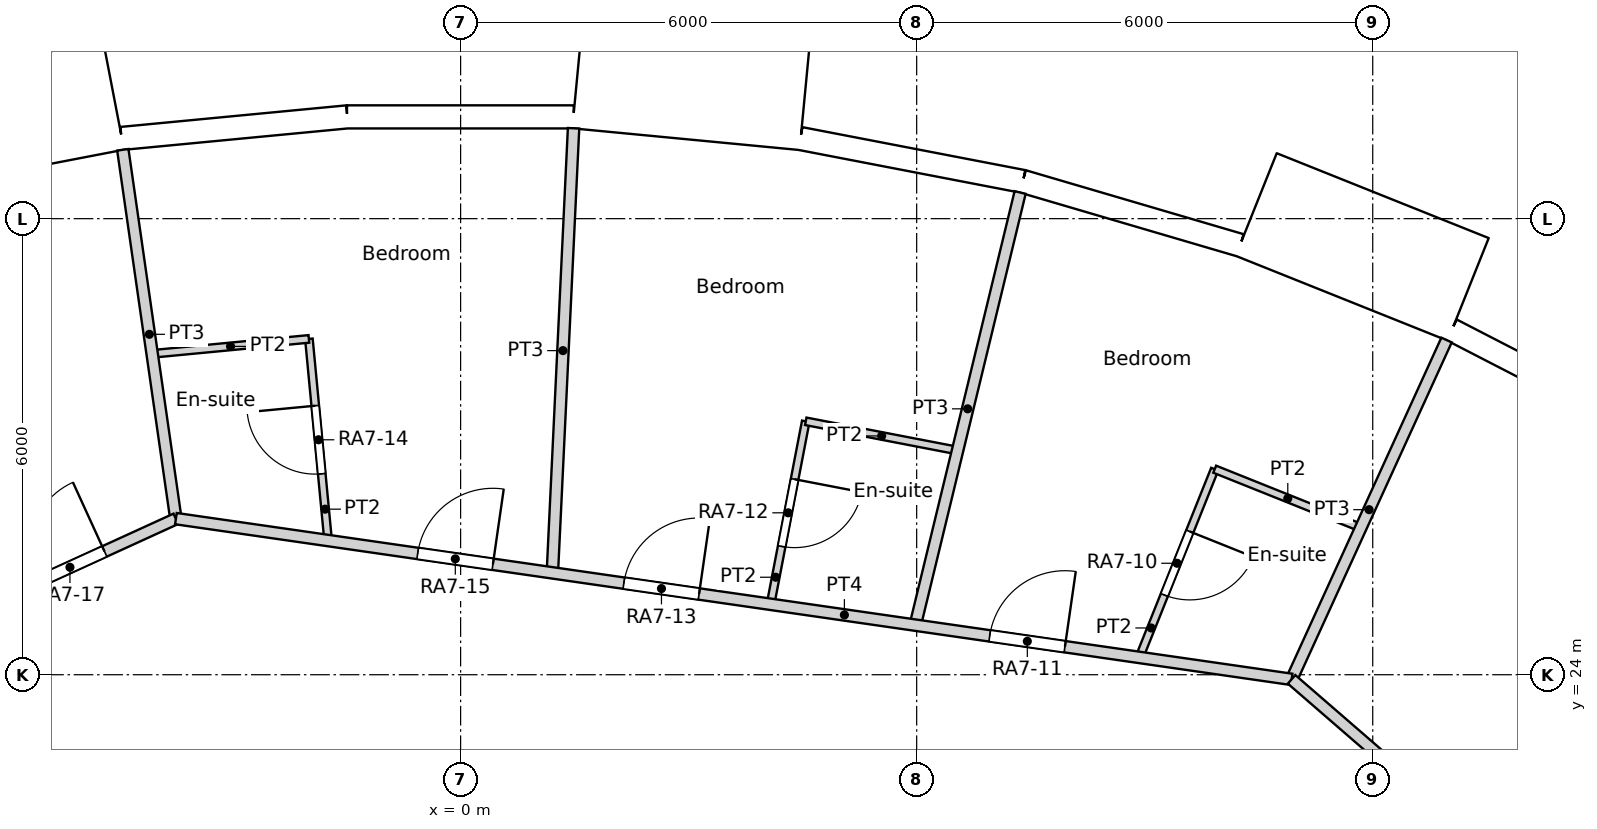
"""IFC4 building model, lengths in metres.
Left out: names, types, materials, properties, quantities, classifications, styles, units other than length and angle.
Written with IfcOpenShell. Run it as: python <this file> out.ifc"""

import sys

from ifc_helpers import new_model, si_unit, direction, frame, frame_2d, origin, origin_2d, place, context, subcontext, project, spatial, rectangle, circle, extrude, element, fill, save


model = new_model("IFC4")
c1 = context("Model", 3, precision=1e-05, world=origin(), true_north=direction((0.0, 1.0)))
c2 = subcontext(c1, "Body", "Model", "MODEL_VIEW")
j1 = project(units=[si_unit("LENGTHUNIT", "METRE"), si_unit("PLANEANGLEUNIT", "RADIAN")], contexts=[c1])
p1 = place(None, origin())
s1 = spatial("IfcSite", under=j1, at=p1, CompositionType="ELEMENT")
p2 = place(p1, origin())
s2 = spatial("IfcBuilding", under=s1, at=p2, CompositionType="ELEMENT")
p3 = place(p2, frame((0.0, 0.0, 93.0)))
s3 = spatial("IfcBuildingStorey", under=s2, at=p3, CompositionType="ELEMENT", Elevation=93.0)
for number, where, z_axis, x_axis in (
    (1, (12.576, 27.539, 0.0), (0.0, 0.0, 1.0), (1.0, 0.0, 0.0)),
    (2, (7.137, 29.421, 0.0), (0.0, 0.0, 1.0), (1.0, 0.0, 0.0)),
    (3, (1.44, 30.24, 0.0), (0.0, 0.0, 1.0), (1.0, 0.0, 0.0)),
    (4, (-4.309, 29.966, 0.0), (0.0, 0.0, 1.0), (1.0, 0.0, 0.0)),
):
    element("IfcColumn", number, at=place(p3, frame(where, z_axis=z_axis, x_axis=x_axis)), inside=s3, PredefinedType="COLUMN", context=c2, shape_type="SweptSolid", body=[
        extrude(circle(Radius=0.6, at=origin_2d()), origin(), (0.0, 0.0, 1.0), 3.6),
    ])
for number, where, z_axis, x_axis in (
    (5, (9.723, 22.54, 0.0), (0.0, 0.0, 1.0), (1.0, 0.0, 0.0)),
    (6, (4.263, 24.175, 0.0), (0.0, 0.0, 1.0), (1.0, 0.0, 0.0)),
    (7, (-1.427, 24.506, 0.0), (0.0, 0.0, 1.0), (1.0, 0.0, 0.0)),
):
    element("IfcColumn", number, at=place(p3, frame(where, z_axis=z_axis, x_axis=x_axis)), inside=s3, PredefinedType="COLUMN", context=c2, shape_type="SweptSolid", body=[
        extrude(circle(Radius=0.65, at=origin_2d()), origin(), (0.0, 0.0, 1.0), 3.6),
    ])
p4 = place(p3, frame((15.687, 27.171, 0.0), z_axis=(0.0, 0.0, 1.0), x_axis=(-0.888853225096, 0.4581920386, 0.0)))
e8 = element("IfcWall", 8, at=p4, inside=s3, PredefinedType="SOLIDWALL", context=c2, shape_type="SweptSolid", body=[
    extrude(rectangle(XDim=2.979, YDim=0.3, at=frame_2d((1.49, 0.0))), origin(), (0.0, 0.0, 1.0), 3.15),
])
p5 = place(p4, frame((1.49, 0.0, 1.55)))
e9 = element("IfcOpeningElement", 9, at=p5, cuts=e8, PredefinedType="OPENING", context=c2, shape_type="SweptSolid", body=[
    extrude(circle(Radius=0.9, at=origin_2d()), frame((0.0, 0.16, 0.0), z_axis=(0.0, -1.0, 0.0), x_axis=(1.0, 0.0, 0.0)), (0.0, 0.0, 1.0), 0.32),
])
p6 = place(p3, frame((13.254, 29.07, -0.45), z_axis=(0.0, 0.0, 1.0), x_axis=(-0.928358776184, 0.371685327504, 0.0)))
e10 = element("IfcWall", 10, at=p6, inside=s3, PredefinedType="ELEMENTEDWALL", context=c2, shape_type="SweptSolid", body=[
    extrude(rectangle(XDim=3.0, YDim=1.45, at=frame_2d((1.5, 0.0))), origin(), (0.0, 0.0, 1.0), 3.6),
])
p7 = place(p6, frame((1.5, 0.0, 2.0)))
e11 = element("IfcOpeningElement", 11, at=p7, cuts=e10, PredefinedType="OPENING", context=c2, shape_type="SweptSolid", body=[
    extrude(circle(Radius=0.9, at=origin_2d()), frame((0.0, 0.735, 0.0), z_axis=(0.0, -1.0, 0.0), x_axis=(1.0, 0.0, 0.0)), (0.0, 0.0, 1.0), 1.47),
])
p8 = place(p3, frame((10.256, 29.651, 0.0), z_axis=(0.0, 0.0, 1.0), x_axis=(-0.959507586834, 0.28168278401, 0.0)))
e12 = element("IfcWall", 12, at=p8, inside=s3, PredefinedType="SOLIDWALL", context=c2, shape_type="SweptSolid", body=[
    extrude(rectangle(XDim=2.98, YDim=0.3, at=frame_2d((1.49, 0.0))), origin(), (0.0, 0.0, 1.0), 3.15),
])
p9 = place(p8, frame((1.49, 0.0, 1.55)))
e13 = element("IfcOpeningElement", 13, at=p9, cuts=e12, PredefinedType="OPENING", context=c2, shape_type="SweptSolid", body=[
    extrude(circle(Radius=0.9, at=origin_2d()), frame((0.0, 0.16, 0.0), z_axis=(0.0, -1.0, 0.0), x_axis=(1.0, 0.0, 0.0)), (0.0, 0.0, 1.0), 0.32),
])
p10 = place(p3, frame((7.397, 30.49, 0.0), z_axis=(0.0, 0.0, 1.0), x_axis=(-0.981924535406, 0.189272836848, 0.0)))
e14 = element("IfcWall", 14, at=p10, inside=s3, PredefinedType="SOLIDWALL", context=c2, shape_type="SweptSolid", body=[
    extrude(rectangle(XDim=2.98, YDim=0.3, at=frame_2d((1.49, 0.0))), origin(), (0.0, 0.0, 1.0), 3.15),
])
p11 = place(p10, frame((1.49, 0.0, 1.55)))
e15 = element("IfcOpeningElement", 15, at=p11, cuts=e14, PredefinedType="OPENING", context=c2, shape_type="SweptSolid", body=[
    extrude(circle(Radius=0.9, at=origin_2d()), frame((0.0, 0.16, 0.0), z_axis=(0.0, -1.0, 0.0), x_axis=(1.0, 0.0, 0.0)), (0.0, 0.0, 1.0), 0.32),
])
p12 = place(p3, frame((4.527, 31.627, -0.45), z_axis=(0.0, 0.0, 1.0), x_axis=(-0.995472768558, 0.09504718333, 0.0)))
e16 = element("IfcWall", 16, at=p12, inside=s3, PredefinedType="ELEMENTEDWALL", context=c2, shape_type="SweptSolid", body=[
    extrude(rectangle(XDim=3.0, YDim=1.45, at=frame_2d((1.5, 0.0))), origin(), (0.0, 0.0, 1.0), 3.6),
])
p13 = place(p12, frame((1.5, 0.0, 2.0)))
e17 = element("IfcOpeningElement", 17, at=p13, cuts=e16, PredefinedType="OPENING", context=c2, shape_type="SweptSolid", body=[
    extrude(circle(Radius=0.9, at=origin_2d()), frame((0.0, 0.735, 0.0), z_axis=(0.0, -1.0, 0.0), x_axis=(1.0, 0.0, 0.0)), (0.0, 0.0, 1.0), 1.47),
])
p14 = place(p3, frame((1.487, 31.339, 0.0), z_axis=(0.0, 0.0, 1.0), x_axis=(-1.0, 0.0, 0.0)))
e18 = element("IfcWall", 18, at=p14, inside=s3, PredefinedType="SOLIDWALL", context=c2, shape_type="SweptSolid", body=[
    extrude(rectangle(XDim=2.98, YDim=0.3, at=frame_2d((1.49, 0.0))), origin(), (0.0, 0.0, 1.0), 3.15),
])
p15 = place(p14, frame((1.49, 0.0, 1.55)))
e19 = element("IfcOpeningElement", 19, at=p15, cuts=e18, PredefinedType="OPENING", context=c2, shape_type="SweptSolid", body=[
    extrude(circle(Radius=0.9, at=origin_2d()), frame((0.0, 0.16, 0.0), z_axis=(0.0, -1.0, 0.0), x_axis=(1.0, 0.0, 0.0)), (0.0, 0.0, 1.0), 0.32),
])
p16 = place(p3, frame((-1.493, 31.339, 0.0), z_axis=(0.0, 0.0, 1.0), x_axis=(-0.995472611385, -0.095048829468, 0.0)))
e20 = element("IfcWall", 20, at=p16, inside=s3, PredefinedType="SOLIDWALL", context=c2, shape_type="SweptSolid", body=[
    extrude(rectangle(XDim=2.979, YDim=0.3, at=frame_2d((1.49, 0.0))), origin(), (0.0, 0.0, 1.0), 3.15),
])
p17 = place(p16, frame((1.49, 0.0, 1.55)))
e21 = element("IfcOpeningElement", 21, at=p17, cuts=e20, PredefinedType="OPENING", context=c2, shape_type="SweptSolid", body=[
    extrude(circle(Radius=0.9, at=origin_2d()), frame((0.0, 0.16, 0.0), z_axis=(0.0, -1.0, 0.0), x_axis=(1.0, 0.0, 0.0)), (0.0, 0.0, 1.0), 0.32),
])
p18 = place(p3, frame((-4.567, 31.621, -0.45), z_axis=(0.0, 0.0, 1.0), x_axis=(-0.981921602273, -0.189288052949, 0.0)))
e22 = element("IfcWall", 22, at=p18, inside=s3, PredefinedType="ELEMENTEDWALL", context=c2, shape_type="SweptSolid", body=[
    extrude(rectangle(XDim=3.0, YDim=1.45, at=frame_2d((1.5, 0.0))), origin(), (0.0, 0.0, 1.0), 3.6),
])
p19 = place(p18, frame((1.5, 0.0, 2.0)))
e23 = element("IfcOpeningElement", 23, at=p19, cuts=e22, PredefinedType="OPENING", context=c2, shape_type="SweptSolid", body=[
    extrude(circle(Radius=0.9, at=origin_2d()), frame((0.0, 0.735, 0.0), z_axis=(0.0, -1.0, 0.0), x_axis=(1.0, 0.0, 0.0)), (0.0, 0.0, 1.0), 1.47),
])
p20 = place(p3, frame((10.932, 23.939, 0.0), z_axis=(0.0, 0.0, 1.0), x_axis=(0.755823777664, -0.654775088956, 0.0)))
e24 = element("IfcWall", 24, at=p20, inside=s3, PredefinedType="PARTITIONING", context=c2, shape_type="SweptSolid", body=[
    extrude(rectangle(XDim=14.83, YDim=0.15, at=frame_2d((7.415, 0.0))), origin(), (0.0, 0.0, 1.0), 3.15),
])
p21 = place(p20, frame((3.56, 0.0, 0.0)))
e25 = element("IfcOpeningElement", 25, at=p21, cuts=e24, PredefinedType="OPENING", context=c2, shape_type="SweptSolid", body=[
    extrude(rectangle(XDim=1.0, YDim=2.04, at=frame_2d((0.5, 1.02))), frame((0.0, 0.075, 0.0), z_axis=(0.0, -1.0, 0.0), x_axis=(1.0, 0.0, 0.0)), (0.0, 0.0, 1.0), 0.15),
])
p22 = place(p3, frame((-3.746, 26.054, 0.0), z_axis=(0.0, 0.0, 1.0), x_axis=(0.989780545379, -0.142598990138, 0.0)))
e26 = element("IfcWall", 26, at=p22, inside=s3, PredefinedType="PARTITIONING", context=c2, shape_type="SweptSolid", body=[
    extrude(rectangle(XDim=14.83, YDim=0.15, at=frame_2d((7.415, 0.0))), origin(), (0.0, 0.0, 1.0), 3.15),
])
p23 = place(p22, frame((10.817, 0.0, 0.0)))
e27 = element("IfcOpeningElement", 27, at=p23, cuts=e26, PredefinedType="OPENING", context=c2, shape_type="SweptSolid", body=[
    extrude(rectangle(XDim=1.0, YDim=2.1, at=frame_2d((0.5, 1.05))), frame((0.0, 0.075, 0.0), z_axis=(0.0, -1.0, 0.0), x_axis=(1.0, 0.0, 0.0)), (0.0, 0.0, 1.0), 0.15),
])
p24 = place(p22, frame((5.954, 0.0, 0.0)))
e28 = element("IfcOpeningElement", 28, at=p24, cuts=e26, PredefinedType="OPENING", context=c2, shape_type="SweptSolid", body=[
    extrude(rectangle(XDim=1.0, YDim=2.1, at=frame_2d((0.5, 1.05))), frame((0.0, 0.075, 0.0), z_axis=(0.0, -1.0, 0.0), x_axis=(1.0, 0.0, 0.0)), (0.0, 0.0, 1.0), 0.15),
])
p25 = place(p22, frame((3.214, 0.0, 0.0)))
e29 = element("IfcOpeningElement", 29, at=p25, cuts=e26, PredefinedType="OPENING", context=c2, shape_type="SweptSolid", body=[
    extrude(rectangle(XDim=1.0, YDim=2.1, at=frame_2d((0.5, 1.05))), frame((0.0, 0.075, 0.0), z_axis=(0.0, -1.0, 0.0), x_axis=(1.0, 0.0, 0.0)), (0.0, 0.0, 1.0), 0.15),
])
p26 = place(p3, frame((-17.234, 19.888, 0.0), z_axis=(0.0, 0.0, 1.0), x_axis=(0.90953867323, 0.415619299238, 0.0)))
e30 = element("IfcWall", 30, at=p26, inside=s3, PredefinedType="PARTITIONING", context=c2, shape_type="SweptSolid", body=[
    extrude(rectangle(XDim=14.829, YDim=0.15, at=frame_2d((7.415, 0.0))), origin(), (0.0, 0.0, 1.0), 3.15),
])
p27 = place(p26, frame((12.797, 0.0, 0.0)))
e31 = element("IfcOpeningElement", 31, at=p27, cuts=e30, PredefinedType="OPENING", context=c2, shape_type="SweptSolid", body=[
    extrude(rectangle(XDim=1.0, YDim=2.1, at=frame_2d((0.5, 1.05))), frame((0.0, 0.075, 0.0), z_axis=(0.0, -1.0, 0.0), x_axis=(1.0, 0.0, 0.0)), (0.0, 0.0, 1.0), 0.15),
])
p28 = place(p26, frame((3.115, 0.0, 0.0)))
e32 = element("IfcOpeningElement", 32, at=p28, cuts=e30, PredefinedType="OPENING", context=c2, shape_type="SweptSolid", body=[
    extrude(rectangle(XDim=1.0, YDim=2.04, at=frame_2d((0.5, 1.02))), frame((0.0, 0.075, 0.0), z_axis=(0.0, -1.0, 0.0), x_axis=(1.0, 0.0, 0.0)), (0.0, 0.0, 1.0), 0.15),
])
p29 = place(p3, frame((10.933, 23.94, 0.0), z_axis=(0.0, 0.0, 1.0), x_axis=(0.415286978667, 0.909690455787, 0.0)))
e33 = element("IfcWall", 33, at=p29, inside=s3, PredefinedType="PARTITIONING", context=c2, shape_type="SweptSolid", body=[
    extrude(rectangle(XDim=4.906, YDim=0.15, at=frame_2d((2.453, 0.0))), origin(), (0.0, 0.0, 1.0), 3.15),
])
p30 = place(p3, frame((9.921, 26.704, 0.0), z_axis=(0.0, 0.0, 1.0), x_axis=(0.928346586681, -0.37171577179, 0.0)))
e34 = element("IfcWall", 34, at=p30, inside=s3, PredefinedType="PARTITIONING", context=c2, shape_type="SweptSolid", body=[
    extrude(rectangle(XDim=2.072, YDim=0.1, at=frame_2d((1.036, 0.0))), origin(), (0.0, 0.0, 1.0), 3.15),
])
p31 = place(p3, frame((8.93, 24.228, 0.0), z_axis=(0.0, 0.0, 1.0), x_axis=(0.371564281805, 0.928407229876, 0.0)))
e35 = element("IfcWall", 35, at=p31, inside=s3, PredefinedType="PARTITIONING", context=c2, shape_type="SweptSolid", body=[
    extrude(rectangle(XDim=2.667, YDim=0.1, at=frame_2d((1.333, 0.0))), origin(), (0.0, 0.0, 1.0), 3.15),
])
p32 = place(p31, frame((0.884, 0.0, 0.0)))
e36 = element("IfcOpeningElement", 36, at=p32, cuts=e35, PredefinedType="OPENING", context=c2, shape_type="SweptSolid", body=[
    extrude(rectangle(XDim=0.9, YDim=2.04, at=frame_2d((0.45, 1.02))), frame((0.0, 0.05, 0.0), z_axis=(0.0, -1.0, 0.0), x_axis=(1.0, 0.0, 0.0)), (0.0, 0.0, 1.0), 0.1),
])
p33 = place(p3, frame((5.981, 24.652, 0.0), z_axis=(0.0, 0.0, 1.0), x_axis=(0.235604797906, 0.971848948759, 0.0)))
e37 = element("IfcWall", 37, at=p33, inside=s3, PredefinedType="PARTITIONING", context=c2, shape_type="SweptSolid", body=[
    extrude(rectangle(XDim=5.857, YDim=0.15, at=frame_2d((2.928, 0.0))), origin(), (0.0, 0.0, 1.0), 3.15),
])
p34 = place(p3, frame((4.541, 27.334, 0.0), z_axis=(0.0, 0.0, 1.0), x_axis=(0.981919009751, -0.189301501024, 0.0)))
e38 = element("IfcWall", 38, at=p34, inside=s3, PredefinedType="PARTITIONING", context=c2, shape_type="SweptSolid", body=[
    extrude(rectangle(XDim=2.034, YDim=0.1, at=frame_2d((1.017, 0.0))), origin(), (0.0, 0.0, 1.0), 3.15),
])
p35 = place(p3, frame((4.077, 24.926, 0.0), z_axis=(0.0, 0.0, 1.0), x_axis=(0.18925724964, 0.981927539821, 0.0)))
e39 = element("IfcWall", 39, at=p35, inside=s3, PredefinedType="PARTITIONING", context=c2, shape_type="SweptSolid", body=[
    extrude(rectangle(XDim=2.452, YDim=0.1, at=frame_2d((1.226, 0.0))), origin(), (0.0, 0.0, 1.0), 3.15),
])
p36 = place(p35, frame((0.776, 0.0, 0.0)))
e40 = element("IfcOpeningElement", 40, at=p36, cuts=e39, PredefinedType="OPENING", context=c2, shape_type="SweptSolid", body=[
    extrude(rectangle(XDim=0.9, YDim=2.04, at=frame_2d((0.45, 1.02))), frame((0.0, 0.05, 0.0), z_axis=(0.0, -1.0, 0.0), x_axis=(1.0, 0.0, 0.0)), (0.0, 0.0, 1.0), 0.1),
])
p37 = place(p3, frame((1.207, 25.339, 0.0), z_axis=(0.0, 0.0, 1.0), x_axis=(0.047648334785, 0.998864173045, 0.0)))
e41 = element("IfcWall", 41, at=p37, inside=s3, PredefinedType="PARTITIONING", context=c2, shape_type="SweptSolid", body=[
    extrude(rectangle(XDim=5.856, YDim=0.15, at=frame_2d((2.928, 0.0))), origin(), (0.0, 0.0, 1.0), 3.15),
])
p38 = place(p3, frame((-1.996, 28.418, 0.0), z_axis=(0.0, 0.0, 1.0), x_axis=(0.094925726797, -0.995484357683, 0.0)))
e42 = element("IfcWall", 42, at=p38, inside=s3, PredefinedType="PARTITIONING", context=c2, shape_type="SweptSolid", body=[
    extrude(rectangle(XDim=2.667, YDim=0.1, at=frame_2d((1.333, 0.0))), origin(), (0.0, 0.0, 1.0), 3.15),
])
p39 = place(p38, frame((0.883, 0.0, 0.0)))
e43 = element("IfcOpeningElement", 43, at=p39, cuts=e42, PredefinedType="OPENING", context=c2, shape_type="SweptSolid", body=[
    extrude(rectangle(XDim=0.9, YDim=2.04, at=frame_2d((0.45, 1.02))), frame((0.0, 0.05, 0.0), z_axis=(0.0, -1.0, 0.0), x_axis=(1.0, 0.0, 0.0)), (0.0, 0.0, 1.0), 0.1),
])
p40 = place(p3, frame((-4.058, 28.221, 0.0), z_axis=(0.0, 0.0, 1.0), x_axis=(0.995466291052, 0.095115000814, 0.0)))
e44 = element("IfcWall", 44, at=p40, inside=s3, PredefinedType="PARTITIONING", context=c2, shape_type="SweptSolid", body=[
    extrude(rectangle(XDim=2.071, YDim=0.1, at=frame_2d((1.036, 0.0))), origin(), (0.0, 0.0, 1.0), 3.15),
])
p41 = place(p3, frame((-4.444, 30.906, 0.0), z_axis=(0.0, 0.0, 1.0), x_axis=(0.142306296561, -0.989822669956, 0.0)))
e45 = element("IfcWall", 45, at=p41, inside=s3, PredefinedType="PARTITIONING", context=c2, shape_type="SweptSolid", body=[
    extrude(rectangle(XDim=4.905, YDim=0.15, at=frame_2d((2.452, 0.0))), origin(), (0.0, 0.0, 1.0), 3.15),
])
p42 = place(p5, origin())
e46 = element("IfcWindow", 46, at=p42, inside=s3, PartitioningType="SINGLE_PANEL", PredefinedType="WINDOW", context=c2, shape_type="SweptSolid", body=[
    extrude(circle(Radius=0.9, at=origin_2d()), frame((0.0, 0.12, 0.0), z_axis=(0.0, -1.0, 0.0), x_axis=(1.0, 0.0, 0.0)), (0.0, 0.0, 1.0), 0.1),
])
fill(e9, e46)
p43 = place(p7, origin())
e47 = element("IfcWindow", 47, at=p43, inside=s3, PartitioningType="SINGLE_PANEL", PredefinedType="WINDOW", context=c2, shape_type="SweptSolid", body=[
    extrude(circle(Radius=0.9, at=origin_2d()), frame((0.0, 0.695, 0.0), z_axis=(0.0, -1.0, 0.0), x_axis=(1.0, 0.0, 0.0)), (0.0, 0.0, 1.0), 0.1),
])
fill(e11, e47)
p44 = place(p9, origin())
e48 = element("IfcWindow", 48, at=p44, inside=s3, PartitioningType="SINGLE_PANEL", PredefinedType="WINDOW", context=c2, shape_type="SweptSolid", body=[
    extrude(circle(Radius=0.9, at=origin_2d()), frame((0.0, 0.12, 0.0), z_axis=(0.0, -1.0, 0.0), x_axis=(1.0, 0.0, 0.0)), (0.0, 0.0, 1.0), 0.1),
])
fill(e13, e48)
p45 = place(p11, origin())
e49 = element("IfcWindow", 49, at=p45, inside=s3, PartitioningType="SINGLE_PANEL", PredefinedType="WINDOW", context=c2, shape_type="SweptSolid", body=[
    extrude(circle(Radius=0.9, at=origin_2d()), frame((0.0, 0.12, 0.0), z_axis=(0.0, -1.0, 0.0), x_axis=(1.0, 0.0, 0.0)), (0.0, 0.0, 1.0), 0.1),
])
fill(e15, e49)
p46 = place(p13, origin())
e50 = element("IfcWindow", 50, at=p46, inside=s3, PartitioningType="SINGLE_PANEL", PredefinedType="WINDOW", context=c2, shape_type="SweptSolid", body=[
    extrude(circle(Radius=0.9, at=origin_2d()), frame((0.0, 0.695, 0.0), z_axis=(0.0, -1.0, 0.0), x_axis=(1.0, 0.0, 0.0)), (0.0, 0.0, 1.0), 0.1),
])
fill(e17, e50)
p47 = place(p15, origin())
e51 = element("IfcWindow", 51, at=p47, inside=s3, PartitioningType="SINGLE_PANEL", PredefinedType="WINDOW", context=c2, shape_type="SweptSolid", body=[
    extrude(circle(Radius=0.9, at=origin_2d()), frame((0.0, 0.12, 0.0), z_axis=(0.0, -1.0, 0.0), x_axis=(1.0, 0.0, 0.0)), (0.0, 0.0, 1.0), 0.1),
])
fill(e19, e51)
p48 = place(p17, origin())
e52 = element("IfcWindow", 52, at=p48, inside=s3, PartitioningType="SINGLE_PANEL", PredefinedType="WINDOW", context=c2, shape_type="SweptSolid", body=[
    extrude(circle(Radius=0.9, at=origin_2d()), frame((0.0, 0.12, 0.0), z_axis=(0.0, -1.0, 0.0), x_axis=(1.0, 0.0, 0.0)), (0.0, 0.0, 1.0), 0.1),
])
fill(e21, e52)
p49 = place(p19, origin())
e53 = element("IfcWindow", 53, at=p49, inside=s3, PartitioningType="SINGLE_PANEL", PredefinedType="WINDOW", context=c2, shape_type="SweptSolid", body=[
    extrude(circle(Radius=0.9, at=origin_2d()), frame((0.0, 0.695, 0.0), z_axis=(0.0, -1.0, 0.0), x_axis=(1.0, 0.0, 0.0)), (0.0, 0.0, 1.0), 0.1),
])
fill(e23, e53)
p50 = place(p32, origin())
e54 = element("IfcDoor", 54, at=p50, inside=s3, OperationType="SINGLE_SWING_LEFT", PredefinedType="DOOR", context=c2, shape_type="SweptSolid", body=[
    extrude(rectangle(XDim=0.9, YDim=2.04, at=frame_2d((0.45, 1.02))), frame((0.0, 0.025, 0.0), z_axis=(0.0, -1.0, 0.0), x_axis=(1.0, 0.0, 0.0)), (0.0, 0.0, 1.0), 0.05),
])
fill(e36, e54)
p51 = place(p23, origin())
e55 = element("IfcDoor", 55, at=p51, inside=s3, OperationType="SINGLE_SWING_RIGHT", PredefinedType="DOOR", context=c2, shape_type="SweptSolid", body=[
    extrude(rectangle(XDim=1.0, YDim=2.1, at=frame_2d((0.5, 1.05))), frame((0.0, 0.025, 0.0), z_axis=(0.0, -1.0, 0.0), x_axis=(1.0, 0.0, 0.0)), (0.0, 0.0, 1.0), 0.05),
])
fill(e27, e55)
p52 = place(p36, origin())
e56 = element("IfcDoor", 56, at=p52, inside=s3, OperationType="SINGLE_SWING_LEFT", PredefinedType="DOOR", context=c2, shape_type="SweptSolid", body=[
    extrude(rectangle(XDim=0.9, YDim=2.04, at=frame_2d((0.45, 1.02))), frame((0.0, 0.025, 0.0), z_axis=(0.0, -1.0, 0.0), x_axis=(1.0, 0.0, 0.0)), (0.0, 0.0, 1.0), 0.05),
])
fill(e40, e56)
p53 = place(p24, origin())
e57 = element("IfcDoor", 57, at=p53, inside=s3, OperationType="SINGLE_SWING_RIGHT", PredefinedType="DOOR", context=c2, shape_type="SweptSolid", body=[
    extrude(rectangle(XDim=1.0, YDim=2.1, at=frame_2d((0.5, 1.05))), frame((0.0, 0.025, 0.0), z_axis=(0.0, -1.0, 0.0), x_axis=(1.0, 0.0, 0.0)), (0.0, 0.0, 1.0), 0.05),
])
fill(e28, e57)
p54 = place(p39, origin())
e58 = element("IfcDoor", 58, at=p54, inside=s3, OperationType="SINGLE_SWING_RIGHT", PredefinedType="DOOR", context=c2, shape_type="SweptSolid", body=[
    extrude(rectangle(XDim=0.9, YDim=2.04, at=frame_2d((0.45, 1.02))), frame((0.0, 0.025, 0.0), z_axis=(0.0, -1.0, 0.0), x_axis=(1.0, 0.0, 0.0)), (0.0, 0.0, 1.0), 0.05),
])
fill(e43, e58)
p55 = place(p25, origin())
e59 = element("IfcDoor", 59, at=p55, inside=s3, OperationType="SINGLE_SWING_RIGHT", PredefinedType="DOOR", context=c2, shape_type="SweptSolid", body=[
    extrude(rectangle(XDim=1.0, YDim=2.1, at=frame_2d((0.5, 1.05))), frame((0.0, 0.025, 0.0), z_axis=(0.0, -1.0, 0.0), x_axis=(1.0, 0.0, 0.0)), (0.0, 0.0, 1.0), 0.05),
])
fill(e29, e59)
p56 = place(p27, origin())
e60 = element("IfcDoor", 60, at=p56, inside=s3, OperationType="SINGLE_SWING_RIGHT", PredefinedType="DOOR", context=c2, shape_type="SweptSolid", body=[
    extrude(rectangle(XDim=1.0, YDim=2.1, at=frame_2d((0.5, 1.05))), frame((0.0, 0.025, 0.0), z_axis=(0.0, -1.0, 0.0), x_axis=(1.0, 0.0, 0.0)), (0.0, 0.0, 1.0), 0.05),
])
fill(e31, e60)
save(model, sys.argv[1])
